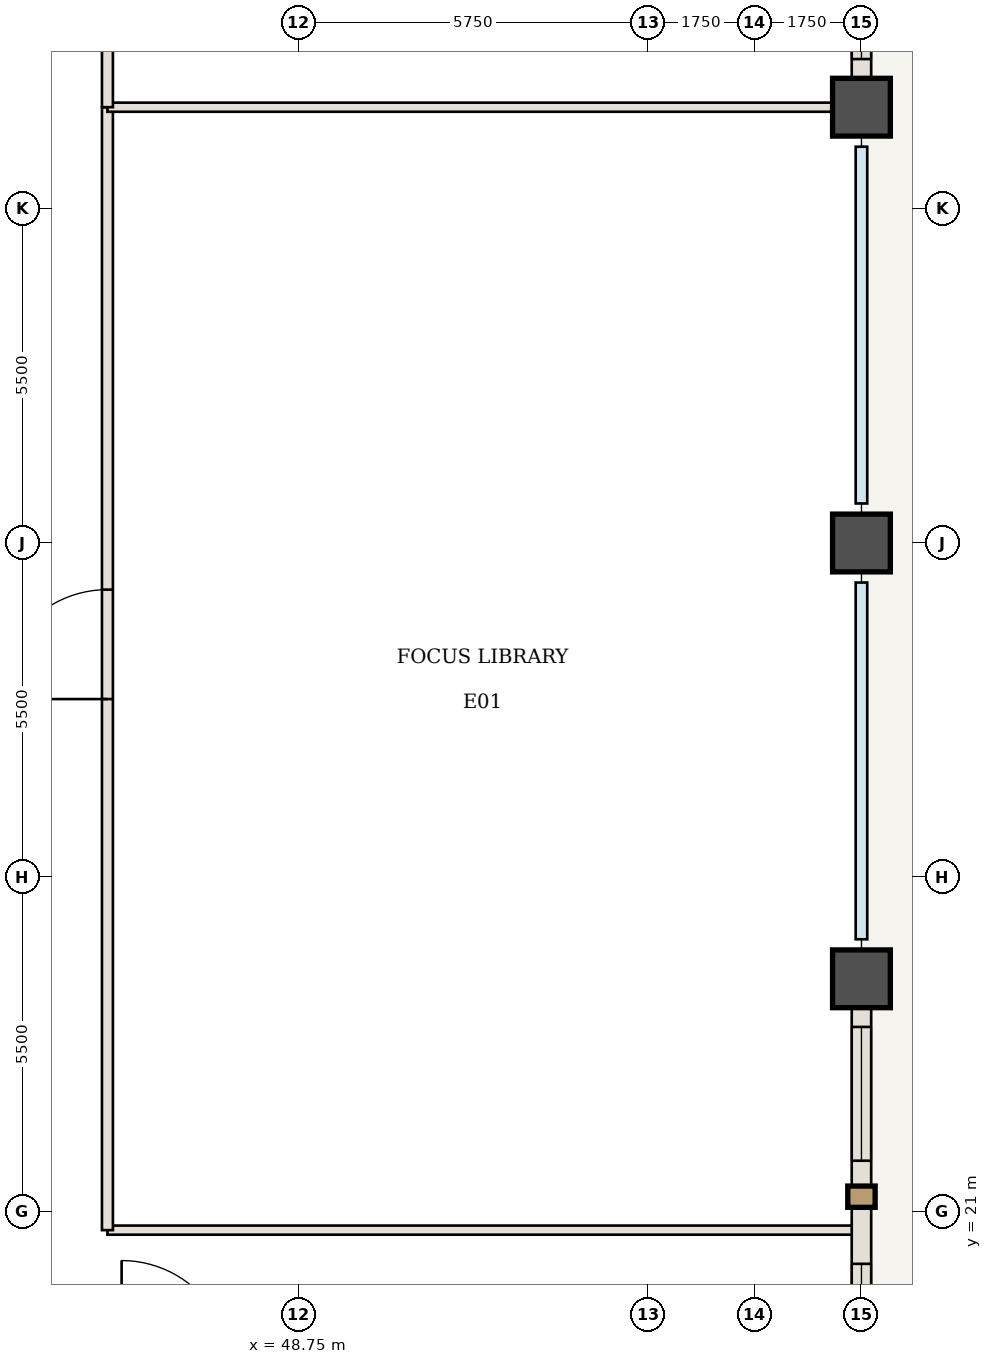
"""IFC4 building model, lengths in metres.
Left out: names, types, materials, properties, quantities, classifications, styles, units other than length and angle.
Written with IfcOpenShell. Run it as: python <this file> out.ifc"""

import sys

from ifc_helpers import new_model, si_unit, direction, frame, frame_2d, origin, origin_2d, place, context, subcontext, project, spatial, rectangle, extrude, element, fill, save


model = new_model("IFC4")
c1 = context("Model", 3, precision=1e-05, world=origin(), true_north=direction((0.0, 1.0)))
c2 = subcontext(c1, "Body", "Model", "MODEL_VIEW")
j1 = project(units=[si_unit("LENGTHUNIT", "METRE"), si_unit("PLANEANGLEUNIT", "RADIAN")], contexts=[c1])
p1 = place(None, origin())
s1 = spatial("IfcSite", under=j1, at=p1, CompositionType="ELEMENT")
p2 = place(p1, origin())
s2 = spatial("IfcBuilding", under=s1, at=p2, CompositionType="ELEMENT")
p3 = place(p2, frame((0.0, 0.0, 106.05)))
s3 = spatial("IfcBuildingStorey", under=s2, at=p3, CompositionType="ELEMENT", Elevation=106.05)
for number, where, z_axis, x_axis in (
    (1, (58.0, 24.833, -0.42), (0.0, 0.0, 1.0), (1.0, 0.0, 0.0)),
    (2, (58.0, 32.0, -0.42), (0.0, 0.0, 1.0), (1.0, 0.0, 0.0)),
    (3, (58.0, 39.167, -0.42), (0.0, 0.0, 1.0), (1.0, 0.0, 0.0)),
):
    element("IfcColumn", number, at=place(p3, frame(where, z_axis=z_axis, x_axis=x_axis)), inside=s3, PredefinedType="COLUMN", context=c2, shape_type="SweptSolid", body=[
        extrude(rectangle(XDim=0.95, YDim=0.95, at=origin_2d()), origin(), (0.0, 0.0, 1.0), 4.97),
    ])
p4 = place(p3, frame((45.6, 20.7, 0.0), z_axis=(0.0, 0.0, 1.0), x_axis=(1.0, 0.0, 0.0)))
e4 = element("IfcWall", 4, at=p4, inside=s3, PredefinedType="STANDARD", context=c2, shape_type="SweptSolid", body=[
    extrude(rectangle(XDim=12.34, YDim=0.15, at=frame_2d((6.17, 0.0))), origin(), (0.0, 0.0, 1.0), 3.501),
])
p5 = place(p3, frame((45.6, 20.7, 0.0), z_axis=(0.0, 0.0, 1.0), x_axis=(0.0, 1.0, 0.0)))
e5 = element("IfcWall", 5, at=p5, inside=s3, PredefinedType="STANDARD", context=c2, shape_type="SweptSolid", body=[
    extrude(rectangle(XDim=18.467, YDim=0.18, at=frame_2d((9.233, 0.0))), origin(), (0.0, 0.0, 1.0), 4.13),
])
p6 = place(p5, frame((8.733, 0.0, 0.0)))
e6 = element("IfcOpeningElement", 6, at=p6, cuts=e5, PredefinedType="OPENING", context=c2, shape_type="SweptSolid", body=[
    extrude(rectangle(XDim=1.8, YDim=2.35, at=frame_2d((0.9, 1.175))), frame((0.0, 0.1, 0.0), z_axis=(0.0, -1.0, 0.0), x_axis=(1.0, 0.0, 0.0)), (0.0, 0.0, 1.0), 0.2),
])
p7 = place(p3, frame((45.6, 39.167, 0.0), z_axis=(0.0, 0.0, 1.0), x_axis=(1.0, 0.0, 0.0)))
e7 = element("IfcWall", 7, at=p7, inside=s3, PredefinedType="STANDARD", context=c2, shape_type="SweptSolid", body=[
    extrude(rectangle(XDim=12.34, YDim=0.15, at=frame_2d((6.17, 0.0))), origin(), (0.0, 0.0, 1.0), 4.13),
])
p8 = place(p3, frame((45.6, 39.167, 0.0), z_axis=(0.0, 0.0, 1.0), x_axis=(0.0, 1.0, 0.0)))
e8 = element("IfcWall", 8, at=p8, inside=s3, PredefinedType="STANDARD", context=c2, shape_type="SweptSolid", body=[
    extrude(rectangle(XDim=4.133, YDim=0.18, at=frame_2d((2.067, 0.0))), origin(), (0.0, 0.0, 1.0), 4.13),
])
p9 = place(p8, frame((1.567, 0.0, 0.0)))
e9 = element("IfcOpeningElement", 9, at=p9, cuts=e8, PredefinedType="OPENING", context=c2, shape_type="SweptSolid", body=[
    extrude(rectangle(XDim=1.8, YDim=2.35, at=frame_2d((0.9, 1.175))), frame((0.0, 0.1, 0.0), z_axis=(0.0, -1.0, 0.0), x_axis=(1.0, 0.0, 0.0)), (0.0, 0.0, 1.0), 0.2),
])
p10 = place(p3, frame((58.0, 24.833, 0.0), z_axis=(0.0, 0.0, 1.0), x_axis=(0.0, -1.0, 0.0)))
e10 = element("IfcWall", 10, at=p10, inside=s3, PredefinedType="USERDEFINED", context=c2, shape_type="SweptSolid", body=[
    extrude(rectangle(XDim=7.167, YDim=0.32, at=frame_2d((3.583, 0.0))), origin(), (0.0, 0.0, 1.0), 3.33),
])
p11 = place(p10, frame((0.792, 0.0, 0.85)))
e11 = element("IfcOpeningElement", 11, at=p11, cuts=e10, PredefinedType="OPENING", context=c2, shape_type="SweptSolid", body=[
    extrude(rectangle(XDim=2.2, YDim=2.2, at=frame_2d((1.1, 1.1))), frame((0.0, 0.17, 0.0), z_axis=(0.0, -1.0, 0.0), x_axis=(1.0, 0.0, 0.0)), (0.0, 0.0, 1.0), 0.34),
])
p12 = place(p10, frame((4.688, 0.0, 0.85)))
e12 = element("IfcOpeningElement", 12, at=p12, cuts=e10, PredefinedType="OPENING", context=c2, shape_type="SweptSolid", body=[
    extrude(rectangle(XDim=1.6, YDim=2.15, at=frame_2d((0.8, 1.075))), frame((0.0, 0.17, 0.0), z_axis=(0.0, -1.0, 0.0), x_axis=(1.0, 0.0, 0.0)), (0.0, 0.0, 1.0), 0.34),
])
p13 = place(p3, frame((58.0, 46.333, 0.0), z_axis=(0.0, 0.0, 1.0), x_axis=(0.0, -1.0, 0.0)))
e13 = element("IfcWall", 13, at=p13, inside=s3, PredefinedType="USERDEFINED", context=c2, shape_type="SweptSolid", body=[
    extrude(rectangle(XDim=7.167, YDim=0.32, at=frame_2d((3.583, 0.0))), origin(), (0.0, 0.0, 1.0), 3.33),
])
p14 = place(p13, frame((0.879, 0.0, 0.85)))
e14 = element("IfcOpeningElement", 14, at=p14, cuts=e13, PredefinedType="OPENING", context=c2, shape_type="SweptSolid", body=[
    extrude(rectangle(XDim=1.6, YDim=2.15, at=frame_2d((0.8, 1.075))), frame((0.0, 0.17, 0.0), z_axis=(0.0, -1.0, 0.0), x_axis=(1.0, 0.0, 0.0)), (0.0, 0.0, 1.0), 0.34),
])
p15 = place(p13, frame((4.175, 0.0, 0.85)))
e15 = element("IfcOpeningElement", 15, at=p15, cuts=e13, PredefinedType="OPENING", context=c2, shape_type="SweptSolid", body=[
    extrude(rectangle(XDim=2.2, YDim=2.2, at=frame_2d((1.1, 1.1))), frame((0.0, 0.17, 0.0), z_axis=(0.0, -1.0, 0.0), x_axis=(1.0, 0.0, 0.0)), (0.0, 0.0, 1.0), 0.34),
])
p16 = place(p6, origin())
e16 = element("IfcDoor", 16, at=p16, inside=s3, OperationType="SINGLE_SWING_LEFT", PredefinedType="DOOR", context=c2, shape_type="SweptSolid", body=[
    extrude(rectangle(XDim=1.8, YDim=2.35, at=frame_2d((0.9, 1.175))), frame((0.0, 0.025, 0.0), z_axis=(0.0, -1.0, 0.0), x_axis=(1.0, 0.0, 0.0)), (0.0, 0.0, 1.0), 0.05),
])
fill(e6, e16)
p17 = place(p11, origin())
e17 = element("IfcWindow", 17, at=p17, inside=s3, PartitioningType="SINGLE_PANEL", PredefinedType="WINDOW", context=c2, shape_type="SweptSolid", body=[
    extrude(rectangle(XDim=2.2, YDim=2.2, at=frame_2d((1.1, 1.1))), frame((0.0, 0.03, 0.0), z_axis=(0.0, -1.0, 0.0), x_axis=(1.0, 0.0, 0.0)), (0.0, 0.0, 1.0), 0.06),
])
fill(e11, e17)
p18 = place(p12, origin())
e18 = element("IfcWindow", 18, at=p18, inside=s3, PartitioningType="SINGLE_PANEL", PredefinedType="WINDOW", context=c2, shape_type="SweptSolid", body=[
    extrude(rectangle(XDim=1.6, YDim=2.15, at=frame_2d((0.8, 1.075))), frame((0.0, 0.03, 0.0), z_axis=(0.0, -1.0, 0.0), x_axis=(1.0, 0.0, 0.0)), (0.0, 0.0, 1.0), 0.06),
])
fill(e12, e18)
p19 = place(p15, origin())
e19 = element("IfcWindow", 19, at=p19, inside=s3, PartitioningType="SINGLE_PANEL", PredefinedType="WINDOW", context=c2, shape_type="SweptSolid", body=[
    extrude(rectangle(XDim=2.2, YDim=2.2, at=frame_2d((1.1, 1.1))), frame((0.0, 0.03, 0.0), z_axis=(0.0, -1.0, 0.0), x_axis=(1.0, 0.0, 0.0)), (0.0, 0.0, 1.0), 0.06),
])
fill(e15, e19)
save(model, sys.argv[1])
